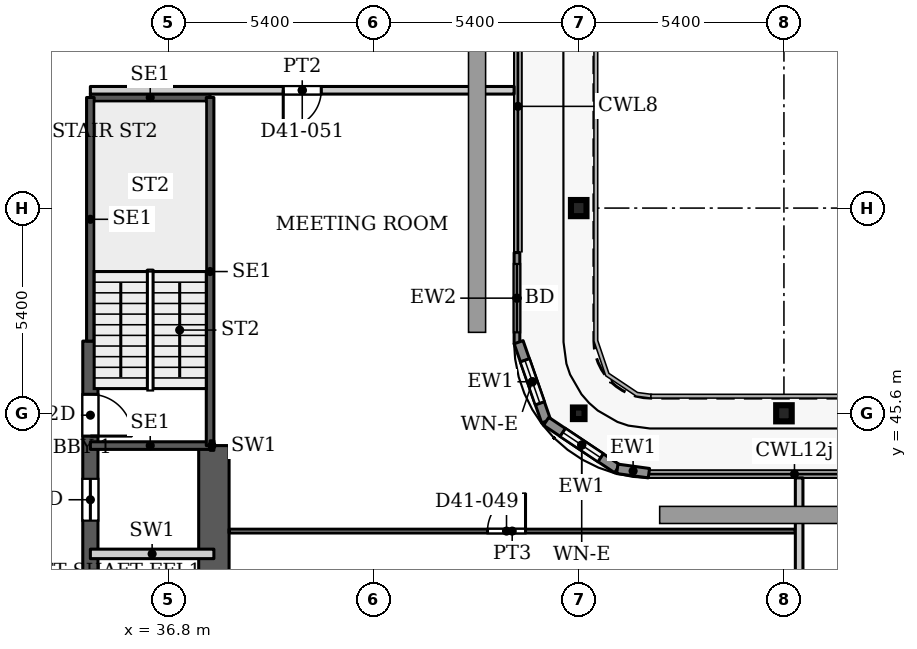
"""IFC4 building model, lengths in metres.
Left out: names, types, materials, properties, quantities, classifications, styles, units other than length and angle.
Written with IfcOpenShell. Run it as: python <this file> out.ifc"""

import sys

from ifc_helpers import new_model, si_unit, direction, frame, frame_2d, origin, origin_2d, place, context, subcontext, project, spatial, rectangle, hollow_rectangle, i_section, extrude, source, transform, mapped, element, fill, save


model = new_model("IFC4")
c1 = context("Model", 3, precision=1e-05, world=origin(), true_north=direction((0.0, 1.0)))
c2 = subcontext(c1, "Body", "Model", "MODEL_VIEW")
j1 = project(units=[si_unit("LENGTHUNIT", "METRE"), si_unit("PLANEANGLEUNIT", "RADIAN")], contexts=[c1])
p1 = place(None, origin())
s1 = spatial("IfcSite", under=j1, at=p1, CompositionType="ELEMENT")
p2 = place(p1, origin())
s2 = spatial("IfcBuilding", under=s1, at=p2, CompositionType="ELEMENT")
p3 = place(p2, frame((0.0, 0.0, 176.0)))
s3 = spatial("IfcBuildingStorey", under=s2, at=p3, CompositionType="ELEMENT", Elevation=176.0)
for number, where, z_axis, x_axis in (
    (1, (53.0, 45.6, 0.0), (0.0, 0.0, 1.0), (1.0, 0.0, 0.0)),
    (2, (47.6, 51.0, 0.0), (0.0, 0.0, 1.0), (1.0, 0.0, 0.0)),
):
    element("IfcColumn", number, at=place(p3, frame(where, z_axis=z_axis, x_axis=x_axis)), inside=s3, PredefinedType="COLUMN", context=c2, shape_type="SweptSolid", body=[
        extrude(i_section(OverallWidth=0.409, OverallDepth=0.425, WebThickness=0.033, FlangeThickness=0.052, FilletRadius=0.013, at=origin_2d()), origin(), (0.0, 0.0, 1.0), 3.9),
    ])
p4 = place(p3, frame((47.6, 45.6, 0.0), z_axis=(0.0, 0.0, 1.0), x_axis=(1.0, 0.0, 0.0)))
e3 = element("IfcColumn", 3, at=p4, inside=s3, PredefinedType="COLUMN", context=c2, shape_type="SweptSolid", body=[
    extrude(hollow_rectangle(XDim=0.305, YDim=0.305, WallThickness=0.016, InnerFilletRadius=0.016, OuterFilletRadius=0.032, at=origin_2d()), origin(), (0.0, 0.0, 1.0), 3.9),
])
p5 = place(p3, frame((34.75, 29.05, 0.0), z_axis=(0.0, 0.0, 1.0), x_axis=(0.0, 1.0, 0.0)))
e4 = element("IfcWall", 4, at=p5, inside=s3, PredefinedType="SHEAR", context=c2, shape_type="SweptSolid", body=[
    extrude(rectangle(XDim=18.45, YDim=0.4, at=frame_2d((9.225, 0.0))), origin(), (0.0, 0.0, 1.0), 3.9),
])
p6 = place(p5, frame((8.025, 0.0, 0.0)))
e5 = element("IfcOpeningElement", 5, at=p6, cuts=e4, PredefinedType="OPENING", context=c2, shape_type="SweptSolid", body=[
    extrude(rectangle(XDim=1.1, YDim=2.2, at=frame_2d((0.55, 1.1))), frame((0.0, 0.21, 0.0), z_axis=(0.0, -1.0, 0.0), x_axis=(1.0, 0.0, 0.0)), (0.0, 0.0, 1.0), 0.42),
])
p7 = place(p5, frame((10.875, 0.0, 0.0)))
e6 = element("IfcOpeningElement", 6, at=p7, cuts=e4, PredefinedType="OPENING", context=c2, shape_type="SweptSolid", body=[
    extrude(rectangle(XDim=1.1, YDim=2.2, at=frame_2d((0.55, 1.1))), frame((0.0, 0.21, 0.0), z_axis=(0.0, -1.0, 0.0), x_axis=(1.0, 0.0, 0.0)), (0.0, 0.0, 1.0), 0.42),
])
p8 = place(p5, frame((13.725, 0.0, 0.0)))
e7 = element("IfcOpeningElement", 7, at=p8, cuts=e4, PredefinedType="OPENING", context=c2, shape_type="SweptSolid", body=[
    extrude(rectangle(XDim=1.1, YDim=2.2, at=frame_2d((0.55, 1.1))), frame((0.0, 0.21, 0.0), z_axis=(0.0, -1.0, 0.0), x_axis=(1.0, 0.0, 0.0)), (0.0, 0.0, 1.0), 0.42),
])
p9 = place(p5, frame((15.95, 0.0, 0.0)))
e8 = element("IfcOpeningElement", 8, at=p9, cuts=e4, PredefinedType="OPENING", context=c2, shape_type="SweptSolid", body=[
    extrude(rectangle(XDim=1.1, YDim=2.2, at=frame_2d((0.55, 1.1))), frame((0.0, 0.21, 0.0), z_axis=(0.0, -1.0, 0.0), x_axis=(1.0, 0.0, 0.0)), (0.0, 0.0, 1.0), 0.42),
])
p10 = place(p3, frame((38.0, 36.2, 0.0), z_axis=(0.0, 0.0, 1.0), x_axis=(0.0, 1.0, 0.0)))
e9 = element("IfcWall", 9, at=p10, inside=s3, PredefinedType="SHEAR", context=c2, shape_type="SweptSolid", body=[
    extrude(rectangle(XDim=8.55, YDim=0.8, at=frame_2d((4.275, 0.0))), origin(), (0.0, 0.0, 1.0), 3.9),
])
p11 = place(p3, frame((45.975, 49.83, 0.0), z_axis=(0.0, 0.0, 1.0), x_axis=(0.0, -1.0, 0.0)))
e10 = element("IfcWall", 10, at=p11, inside=s3, PredefinedType="SOLIDWALL", context=c2, shape_type="SweptSolid", body=[
    extrude(rectangle(XDim=2.4, YDim=0.15, at=frame_2d((1.2, 0.0))), origin(), (0.0, 0.0, 1.0), 3.75),
])
p12 = place(p11, frame((0.3, 0.0, 0.0)))
e11 = element("IfcOpeningElement", 11, at=p12, cuts=e10, PredefinedType="OPENING", context=c2, shape_type="SweptSolid", body=[
    extrude(rectangle(XDim=1.8, YDim=2.4, at=frame_2d((0.9, 1.2))), frame((0.0, 0.085, 0.0), z_axis=(0.0, -1.0, 0.0), x_axis=(1.0, 0.0, 0.0)), (0.0, 0.0, 1.0), 0.17),
])
p13 = place(p3, frame((46.018, 47.471, 0.0), z_axis=(0.0, 0.0, 1.0), x_axis=(0.328791208903, -0.944402637093, 0.0)))
e12 = element("IfcWall", 12, at=p13, inside=s3, PredefinedType="SOLIDWALL", context=c2, shape_type="SweptSolid", body=[
    extrude(rectangle(XDim=2.205, YDim=0.25, at=frame_2d((1.102, 0.0))), origin(), (0.0, 0.0, 1.0), 3.75),
])
p14 = place(p13, frame((0.503, 0.0, 0.6)))
e13 = element("IfcOpeningElement", 13, at=p14, cuts=e12, PredefinedType="OPENING", context=c2, shape_type="SweptSolid", body=[
    extrude(rectangle(XDim=1.2, YDim=2.1, at=frame_2d((0.6, 1.05))), frame((0.0, 0.135, 0.0), z_axis=(0.0, -1.0, 0.0), x_axis=(1.0, 0.0, 0.0)), (0.0, 0.0, 1.0), 0.27),
])
p15 = place(p3, frame((46.743, 45.389, 0.0), z_axis=(0.0, 0.0, 1.0), x_axis=(0.831449265529, -0.555600682912, 0.0)))
e14 = element("IfcWall", 14, at=p15, inside=s3, PredefinedType="SOLIDWALL", context=c2, shape_type="SweptSolid", body=[
    extrude(rectangle(XDim=2.251, YDim=0.25, at=frame_2d((1.126, 0.0))), origin(), (0.0, 0.0, 1.0), 3.75),
])
p16 = place(p15, frame((0.525, 0.0, 0.6)))
e15 = element("IfcOpeningElement", 15, at=p16, cuts=e14, PredefinedType="OPENING", context=c2, shape_type="SweptSolid", body=[
    extrude(rectangle(XDim=1.2, YDim=2.1, at=frame_2d((0.6, 1.05))), frame((0.0, 0.135, 0.0), z_axis=(0.0, -1.0, 0.0), x_axis=(1.0, 0.0, 0.0)), (0.0, 0.0, 1.0), 0.27),
])
p17 = place(p3, frame((48.615, 44.138, 0.0), z_axis=(0.0, 0.0, 1.0), x_axis=(0.990741504246, -0.135761819977, 0.0)))
e16 = element("IfcWall", 16, at=p17, inside=s3, PredefinedType="SOLIDWALL", context=c2, shape_type="SweptSolid", body=[
    extrude(rectangle(XDim=0.84, YDim=0.25, at=frame_2d((0.42, 0.0))), origin(), (0.0, 0.0, 1.0), 3.75),
])
for number, where, z_axis, x_axis in (
    (17, (34.75, 44.75, 0.0), (0.0, 0.0, 1.0), (1.0, 0.0, 0.0)),
    (18, (34.75, 53.91, 0.0), (0.0, 0.0, 1.0), (1.0, 0.0, 0.0)),
):
    element("IfcWall", number, at=place(p3, frame(where, z_axis=z_axis, x_axis=x_axis)), inside=s3, PredefinedType="SHEAR", context=c2, shape_type="SweptSolid", body=[
        extrude(rectangle(XDim=3.15, YDim=0.2, at=frame_2d((1.575, 0.0))), origin(), (0.0, 0.0, 1.0), 3.9),
    ])
p18 = place(p3, frame((34.75, 47.5, 0.0), z_axis=(0.0, 0.0, 1.0), x_axis=(0.0, 1.0, 0.0)))
e19 = element("IfcWall", 19, at=p18, inside=s3, PredefinedType="SHEAR", context=c2, shape_type="SweptSolid", body=[
    extrude(rectangle(XDim=6.41, YDim=0.2, at=frame_2d((3.205, 0.0))), origin(), (0.0, 0.0, 1.0), 3.9),
])
p19 = place(p3, frame((37.9, 44.75, 0.0), z_axis=(0.0, 0.0, 1.0), x_axis=(0.0, 1.0, 0.0)))
e20 = element("IfcWall", 20, at=p19, inside=s3, PredefinedType="SHEAR", context=c2, shape_type="SweptSolid", body=[
    extrude(rectangle(XDim=9.16, YDim=0.2, at=frame_2d((4.58, 0.0))), origin(), (0.0, 0.0, 1.0), 3.9),
])
p20 = place(p3, frame((34.75, 41.9, 0.0), z_axis=(0.0, 0.0, 1.0), x_axis=(1.0, 0.0, 0.0)))
e21 = element("IfcWall", 21, at=p20, inside=s3, PredefinedType="PARTITIONING", context=c2, shape_type="SweptSolid", body=[
    extrude(rectangle(XDim=3.25, YDim=0.25, at=frame_2d((1.625, 0.0))), origin(), (0.0, 0.0, 1.0), 3.9),
])
p21 = place(p3, frame((37.9, 44.75, 0.0), z_axis=(0.0, 0.0, 1.0), x_axis=(1.0, 0.0, 0.0)))
e22 = element("IfcWall", 22, at=p21, inside=s3, PredefinedType="PARTITIONING", context=c2, shape_type="SweptSolid", body=[
    extrude(rectangle(XDim=0.1, YDim=0.25, at=frame_2d((0.05, 0.0))), origin(), (0.0, 0.0, 1.0), 3.9),
])
p22 = place(p3, frame((34.75, 54.1, 0.0), z_axis=(0.0, 0.0, 1.0), x_axis=(1.0, 0.0, 0.0)))
e23 = element("IfcWall", 23, at=p22, inside=s3, PredefinedType="PARTITIONING", context=c2, shape_type="SweptSolid", body=[
    extrude(rectangle(XDim=11.15, YDim=0.2, at=frame_2d((5.575, 0.0))), origin(), (0.0, 0.0, 1.0), 3.6),
])
p23 = place(p22, frame((5.075, 0.0, 0.0)))
e24 = element("IfcOpeningElement", 24, at=p23, cuts=e23, PredefinedType="OPENING", context=c2, shape_type="SweptSolid", body=[
    extrude(rectangle(XDim=1.0, YDim=2.1, at=frame_2d((0.5, 1.05))), frame((0.0, 0.11, 0.0), z_axis=(0.0, -1.0, 0.0), x_axis=(1.0, 0.0, 0.0)), (0.0, 0.0, 1.0), 0.22),
])
p24 = place(p3, frame((38.399, 42.5, 0.0), z_axis=(0.0, 0.0, 1.0), x_axis=(1.0, 0.0, 0.0)))
e25 = element("IfcWall", 25, at=p24, inside=s3, PredefinedType="PARTITIONING", context=c2, shape_type="SweptSolid", body=[
    extrude(rectangle(XDim=14.901, YDim=0.1, at=frame_2d((7.451, 0.0))), origin(), (0.0, 0.0, 1.0), 3.6),
])
p25 = place(p24, frame((6.801, 0.0, 0.0)))
e26 = element("IfcOpeningElement", 26, at=p25, cuts=e25, PredefinedType="OPENING", context=c2, shape_type="SweptSolid", body=[
    extrude(rectangle(XDim=1.0, YDim=2.1, at=frame_2d((0.5, 1.05))), frame((0.0, 0.06, 0.0), z_axis=(0.0, -1.0, 0.0), x_axis=(1.0, 0.0, 0.0)), (0.0, 0.0, 1.0), 0.12),
])
p26 = place(p3, frame((53.4, 36.199, 0.0), z_axis=(0.0, 0.0, 1.0), x_axis=(0.0, 1.0, 0.0)))
e27 = element("IfcWall", 27, at=p26, inside=s3, PredefinedType="PARTITIONING", context=c2, shape_type="SweptSolid", body=[
    extrude(rectangle(XDim=7.701, YDim=0.2, at=frame_2d((3.851, 0.0))), origin(), (0.0, 0.0, 1.0), 3.6),
])
m1 = source(origin(), c2, "Body", "SweptSolid", [
    extrude(rectangle(XDim=1.8, YDim=2.4, at=frame_2d((0.9, 1.2))), frame((0.0, 0.025, 0.0), z_axis=(0.0, -1.0, 0.0), x_axis=(1.0, 0.0, 0.0)), (0.0, 0.0, 1.0), 0.05),
])
p27 = place(p12, origin())
e28 = element("IfcDoor", 28, at=p27, inside=s3, OperationType="SLIDING_TO_LEFT", PredefinedType="DOOR", context=c2, shape_type="MappedRepresentation", body=[
    mapped(m1, transform((0.0, 0.0, 0.0), x_axis=(1.0, 0.0, 0.0), y_axis=(0.0, 1.0, 0.0), z_axis=(0.0, 0.0, 1.0), scale=1.0)),
])
fill(e11, e28)
m2 = source(origin(), c2, "Body", "SweptSolid", [
    extrude(rectangle(XDim=1.2, YDim=2.1, at=frame_2d((0.6, 1.05))), frame((0.0, 0.03, 0.0), z_axis=(0.0, -1.0, 0.0), x_axis=(1.0, 0.0, 0.0)), (0.0, 0.0, 1.0), 0.06),
])
p28 = place(p14, origin())
e29 = element("IfcWindow", 29, at=p28, inside=s3, PartitioningType="SINGLE_PANEL", PredefinedType="WINDOW", context=c2, shape_type="MappedRepresentation", body=[
    mapped(m2, transform((0.0, 0.0, 0.0), x_axis=(1.0, 0.0, 0.0), y_axis=(0.0, 1.0, 0.0), z_axis=(0.0, 0.0, 1.0), scale=1.0)),
])
fill(e13, e29)
p29 = place(p16, origin())
e30 = element("IfcWindow", 30, at=p29, inside=s3, PartitioningType="SINGLE_PANEL", PredefinedType="WINDOW", context=c2, shape_type="MappedRepresentation", body=[
    mapped(m2, transform((0.0, 0.0, 0.0), x_axis=(1.0, 0.0, 0.0), y_axis=(0.0, 1.0, 0.0), z_axis=(0.0, 0.0, 1.0), scale=1.0)),
])
fill(e15, e30)
m3 = source(origin(), c2, "Body", "SweptSolid", [
    extrude(rectangle(XDim=1.1, YDim=2.2, at=frame_2d((0.55, 1.1))), frame((0.0, 0.025, 0.0), z_axis=(0.0, -1.0, 0.0), x_axis=(1.0, 0.0, 0.0)), (0.0, 0.0, 1.0), 0.05),
])
p30 = place(p8, origin())
e31 = element("IfcDoor", 31, at=p30, inside=s3, OperationType="SLIDING_TO_LEFT", PredefinedType="DOOR", context=c2, shape_type="MappedRepresentation", body=[
    mapped(m3, transform((0.0, 0.0, 0.0), x_axis=(1.0, 0.0, 0.0), y_axis=(0.0, 1.0, 0.0), z_axis=(0.0, 0.0, 1.0), scale=1.0)),
])
fill(e7, e31)
m4 = source(origin(), c2, "Body", "SweptSolid", [
    extrude(rectangle(XDim=1.1, YDim=2.2, at=frame_2d((0.55, 1.1))), frame((0.0, 0.025, 0.0), z_axis=(0.0, -1.0, 0.0), x_axis=(1.0, 0.0, 0.0)), (0.0, 0.0, 1.0), 0.05),
])
p31 = place(p9, origin())
e32 = element("IfcDoor", 32, at=p31, inside=s3, OperationType="SINGLE_SWING_RIGHT", PredefinedType="DOOR", context=c2, shape_type="MappedRepresentation", body=[
    mapped(m4, transform((0.0, 0.0, 0.0), x_axis=(1.0, 0.0, 0.0), y_axis=(0.0, 1.0, 0.0), z_axis=(0.0, 0.0, 1.0), scale=1.0)),
])
fill(e8, e32)
m5 = source(origin(), c2, "Body", "SweptSolid", [
    extrude(rectangle(XDim=1.0, YDim=2.1, at=frame_2d((0.5, 1.05))), frame((0.0, 0.025, 0.0), z_axis=(0.0, -1.0, 0.0), x_axis=(1.0, 0.0, 0.0)), (0.0, 0.0, 1.0), 0.05),
])
p32 = place(p25, origin())
e33 = element("IfcDoor", 33, at=p32, inside=s3, OperationType="SINGLE_SWING_LEFT", PredefinedType="DOOR", context=c2, shape_type="MappedRepresentation", body=[
    mapped(m5, transform((0.0, 0.0, 0.0), x_axis=(1.0, 0.0, 0.0), y_axis=(0.0, 1.0, 0.0), z_axis=(0.0, 0.0, 1.0), scale=1.0)),
])
fill(e26, e33)
m6 = source(origin(), c2, "Body", "SweptSolid", [
    extrude(rectangle(XDim=1.0, YDim=2.1, at=frame_2d((0.5, 1.05))), frame((0.0, 0.025, 0.0), z_axis=(0.0, -1.0, 0.0), x_axis=(1.0, 0.0, 0.0)), (0.0, 0.0, 1.0), 0.05),
])
p33 = place(p23, origin())
e34 = element("IfcDoor", 34, at=p33, inside=s3, OperationType="SINGLE_SWING_RIGHT", PredefinedType="DOOR", context=c2, shape_type="MappedRepresentation", body=[
    mapped(m6, transform((0.0, 0.0, 0.0), x_axis=(1.0, 0.0, 0.0), y_axis=(0.0, 1.0, 0.0), z_axis=(0.0, 0.0, 1.0), scale=1.0)),
])
fill(e24, e34)
save(model, sys.argv[1])
